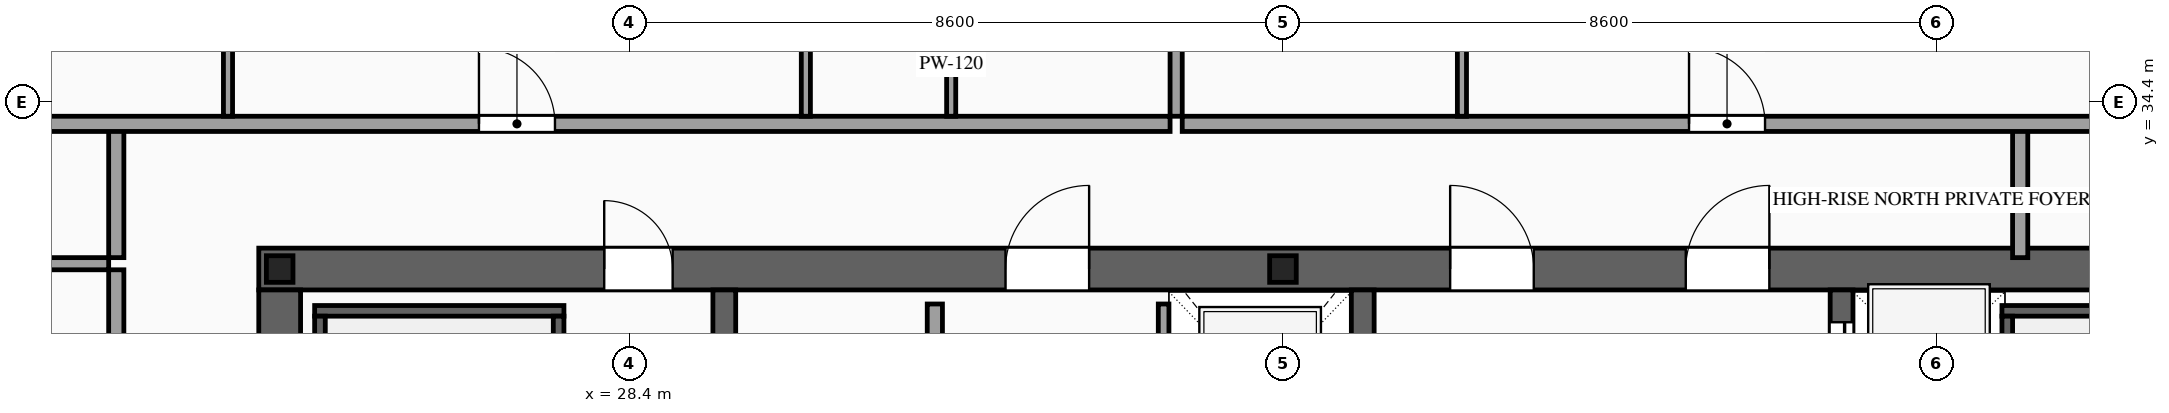
"""IFC4 building model, lengths in metres.
Left out: names, types, materials, properties, quantities, classifications, styles, units other than length and angle.
Written with IfcOpenShell. Run it as: python <this file> out.ifc"""

import sys

from ifc_helpers import new_model, si_unit, direction, frame, frame_2d, origin, origin_2d, place, context, subcontext, project, spatial, rectangle, i_section, extrude, source, transform, mapped, element, fill, save


model = new_model("IFC4")
c1 = context("Model", 3, precision=1e-05, world=origin(), true_north=direction((0.0, 1.0)))
c2 = subcontext(c1, "Body", "Model", "MODEL_VIEW")
j1 = project(units=[si_unit("LENGTHUNIT", "METRE"), si_unit("PLANEANGLEUNIT", "RADIAN")], contexts=[c1])
p1 = place(None, origin())
s1 = spatial("IfcSite", under=j1, at=p1, CompositionType="ELEMENT")
p2 = place(p1, origin())
s2 = spatial("IfcBuilding", under=s1, at=p2, CompositionType="ELEMENT")
p3 = place(p2, frame((0.0, 0.0, 282.1)))
s3 = spatial("IfcBuildingStorey", under=s2, at=p3, CompositionType="ELEMENT", Elevation=282.1)
p4 = place(p3, frame((23.525, 32.2, 0.0), z_axis=(0.0, 0.0, 1.0), x_axis=(1.0, 0.0, 0.0)))
e1 = element("IfcWall", 1, at=p4, inside=s3, PredefinedType="SHEAR", context=c2, shape_type="SweptSolid", body=[
    extrude(rectangle(XDim=26.95, YDim=0.55, at=frame_2d((13.475, 0.0))), origin(), (0.0, 0.0, 1.0), 3.5),
])
p5 = place(p4, frame((4.545, 0.0, 0.0)))
e2 = element("IfcOpeningElement", 2, at=p5, cuts=e1, PredefinedType="OPENING", context=c2, shape_type="SweptSolid", body=[
    extrude(rectangle(XDim=0.9, YDim=2.15, at=frame_2d((0.45, 1.075))), frame((0.0, 0.29, 0.0), z_axis=(0.0, -1.0, 0.0), x_axis=(1.0, 0.0, 0.0)), (0.0, 0.0, 1.0), 0.58),
])
p6 = place(p4, frame((9.825, 0.0, 0.0)))
e3 = element("IfcOpeningElement", 3, at=p6, cuts=e1, PredefinedType="OPENING", context=c2, shape_type="SweptSolid", body=[
    extrude(rectangle(XDim=1.1, YDim=2.2, at=frame_2d((0.55, 1.1))), frame((0.0, 0.29, 0.0), z_axis=(0.0, -1.0, 0.0), x_axis=(1.0, 0.0, 0.0)), (0.0, 0.0, 1.0), 0.58),
])
p7 = place(p4, frame((15.675, 0.0, 0.0)))
e4 = element("IfcOpeningElement", 4, at=p7, cuts=e1, PredefinedType="OPENING", context=c2, shape_type="SweptSolid", body=[
    extrude(rectangle(XDim=1.1, YDim=2.2, at=frame_2d((0.55, 1.1))), frame((0.0, 0.29, 0.0), z_axis=(0.0, -1.0, 0.0), x_axis=(1.0, 0.0, 0.0)), (0.0, 0.0, 1.0), 0.58),
])
p8 = place(p4, frame((18.775, 0.0, 0.0)))
e5 = element("IfcOpeningElement", 5, at=p8, cuts=e1, PredefinedType="OPENING", context=c2, shape_type="SweptSolid", body=[
    extrude(rectangle(XDim=1.1, YDim=2.2, at=frame_2d((0.55, 1.1))), frame((0.0, 0.29, 0.0), z_axis=(0.0, -1.0, 0.0), x_axis=(1.0, 0.0, 0.0)), (0.0, 0.0, 1.0), 0.58),
])
m1 = source(origin(), c2, "Body", "SweptSolid", [
    extrude(rectangle(XDim=12.25, YDim=0.55, at=frame_2d((6.125, 0.0))), origin(), (0.0, 0.0, 1.0), 3.5),
])
p9 = place(p3, frame((23.8, 19.675, 0.0), z_axis=(0.0, 0.0, 1.0), x_axis=(0.0, 1.0, 0.0)))
e6 = element("IfcWall", 6, at=p9, inside=s3, PredefinedType="SHEAR", context=c2, shape_type="MappedRepresentation", body=[
    mapped(m1, transform((0.0, 0.0, 0.0), scale=1.0)),
])
m2 = source(origin(), c2, "Body", "SweptSolid", [
    extrude(rectangle(XDim=12.25, YDim=0.3, at=frame_2d((6.125, 0.0))), origin(), (0.0, 0.0, 1.0), 3.5),
])
for number, where, z_axis, x_axis in (
    (7, (29.65, 19.675, 0.0), (0.0, 0.0, 1.0), (0.0, 1.0, 0.0)),
    (8, (38.05, 19.675, 0.0), (0.0, 0.0, 1.0), (0.0, 1.0, 0.0)),
):
    element("IfcWall", number, at=place(p3, frame(where, z_axis=z_axis, x_axis=x_axis)), inside=s3, PredefinedType="SOLIDWALL", context=c2, shape_type="MappedRepresentation", body=[
        mapped(m2, transform((0.0, 0.0, 0.0), scale=1.0)),
    ])
p10 = place(p3, frame((44.35, 19.675, 0.0), z_axis=(0.0, 0.0, 1.0), x_axis=(0.0, 1.0, 0.0)))
e9 = element("IfcWall", 9, at=p10, inside=s3, PredefinedType="SOLIDWALL", context=c2, shape_type="SweptSolid", body=[
    extrude(rectangle(XDim=12.25, YDim=0.3, at=frame_2d((6.125, 0.0))), origin(), (0.0, 0.0, 1.0), 3.5),
])
p11 = place(p10, frame((6.525, 0.0, 0.0)))
e10 = element("IfcOpeningElement", 10, at=p11, cuts=e9, PredefinedType="OPENING", context=c2, shape_type="SweptSolid", body=[
    extrude(rectangle(XDim=1.1, YDim=2.2, at=frame_2d((0.55, 1.1))), frame((0.0, 0.165, 0.0), z_axis=(0.0, -1.0, 0.0), x_axis=(1.0, 0.0, 0.0)), (0.0, 0.0, 1.0), 0.33),
])
p12 = place(p10, frame((8.625, 0.0, 0.0)))
e11 = element("IfcOpeningElement", 11, at=p12, cuts=e9, PredefinedType="OPENING", context=c2, shape_type="SweptSolid", body=[
    extrude(rectangle(XDim=1.1, YDim=2.2, at=frame_2d((0.55, 1.1))), frame((0.0, 0.165, 0.0), z_axis=(0.0, -1.0, 0.0), x_axis=(1.0, 0.0, 0.0)), (0.0, 0.0, 1.0), 0.33),
])
p13 = place(p10, frame((10.725, 0.0, 0.0)))
e12 = element("IfcOpeningElement", 12, at=p13, cuts=e9, PredefinedType="OPENING", context=c2, shape_type="SweptSolid", body=[
    extrude(rectangle(XDim=1.1, YDim=2.2, at=frame_2d((0.55, 1.1))), frame((0.0, 0.165, 0.0), z_axis=(0.0, -1.0, 0.0), x_axis=(1.0, 0.0, 0.0)), (0.0, 0.0, 1.0), 0.33),
])
m3 = source(origin(), c2, "Body", "SweptSolid", [
    extrude(i_section(OverallWidth=0.35, OverallDepth=0.35, WebThickness=0.012, FlangeThickness=0.019, at=origin_2d()), origin(), (0.0, 0.0, 1.0), 3.5),
])
for number, where, z_axis, x_axis in (
    (13, (23.8, 32.2, 0.0), (0.0, 0.0, 1.0), (1.0, 0.0, 0.0)),
    (14, (37.0, 32.2, 0.0), (0.0, 0.0, 1.0), (1.0, 0.0, 0.0)),
):
    element("IfcColumn", number, at=place(p3, frame(where, z_axis=z_axis, x_axis=x_axis)), inside=s3, PredefinedType="COLUMN", context=c2, shape_type="MappedRepresentation", body=[
        mapped(m3, transform((0.0, 0.0, 0.0), scale=1.0)),
    ])
p14 = place(p3, frame((35.43, 29.4, 0.0), z_axis=(0.0, 0.0, 1.0), x_axis=(0.0, 1.0, 0.0)))
e15 = element("IfcWall", 15, at=p14, inside=s3, PredefinedType="SOLIDWALL", context=c2, shape_type="SweptSolid", body=[
    extrude(rectangle(XDim=2.34, YDim=0.14, at=frame_2d((1.17, 0.0))), origin(), (0.0, 0.0, 1.0), 3.28),
])
p15 = place(p14, frame((0.62, 0.0, 0.0)))
e16 = element("IfcOpeningElement", 16, at=p15, cuts=e15, PredefinedType="OPENING", context=c2, shape_type="SweptSolid", body=[
    extrude(rectangle(XDim=1.1, YDim=2.2, at=frame_2d((0.55, 1.1))), frame((0.0, 0.085, 0.0), z_axis=(0.0, -1.0, 0.0), x_axis=(1.0, 0.0, 0.0)), (0.0, 0.0, 1.0), 0.17),
])
m4 = source(origin(), c2, "Body", "SweptSolid", [
    extrude(rectangle(XDim=3.28, YDim=0.14, at=frame_2d((1.64, 0.0))), origin(), (0.0, 0.0, 1.0), 3.28),
])
p16 = place(p3, frame((24.26, 31.65, 0.0), z_axis=(0.0, 0.0, 1.0), x_axis=(1.0, 0.0, 0.0)))
e17 = element("IfcWall", 17, at=p16, inside=s3, PredefinedType="SOLIDWALL", context=c2, shape_type="MappedRepresentation", body=[
    mapped(m4, transform((0.0, 0.0, 0.0), scale=1.0)),
])
m5 = source(origin(), c2, "Body", "SweptSolid", [
    extrude(rectangle(XDim=8.94, YDim=0.14, at=frame_2d((4.47, 0.0))), origin(), (0.0, 0.0, 1.0), 3.28),
])
for number, where, z_axis, x_axis in (
    (18, (24.33, 22.64, 0.0), (0.0, 0.0, 1.0), (0.0, 1.0, 0.0)),
    (19, (27.47, 22.64, 0.0), (0.0, 0.0, 1.0), (0.0, 1.0, 0.0)),
):
    element("IfcWall", number, at=place(p3, frame(where, z_axis=z_axis, x_axis=x_axis)), inside=s3, PredefinedType="SOLIDWALL", context=c2, shape_type="MappedRepresentation", body=[
        mapped(m5, transform((0.0, 0.0, 0.0), scale=1.0)),
    ])
p17 = place(p3, frame((46.46, 31.65, 0.0), z_axis=(0.0, 0.0, 1.0), x_axis=(1.0, 0.0, 0.0)))
e20 = element("IfcWall", 20, at=p17, inside=s3, PredefinedType="SOLIDWALL", context=c2, shape_type="MappedRepresentation", body=[
    mapped(m4, transform((0.0, 0.0, 0.0), scale=1.0)),
])
p18 = place(p3, frame((46.53, 22.64, 0.0), z_axis=(0.0, 0.0, 1.0), x_axis=(0.0, 1.0, 0.0)))
e21 = element("IfcWall", 21, at=p18, inside=s3, PredefinedType="SOLIDWALL", context=c2, shape_type="MappedRepresentation", body=[
    mapped(m5, transform((0.0, 0.0, 0.0), scale=1.0)),
])
p19 = place(p3, frame((32.42, 19.86, 0.0), z_axis=(0.0, 0.0, 1.0), x_axis=(0.0, 1.0, 0.0)))
e22 = element("IfcWall", 22, at=p19, inside=s3, PredefinedType="PARTITIONING", context=c2, shape_type="SweptSolid", body=[
    extrude(rectangle(XDim=11.88, YDim=0.2, at=frame_2d((5.94, 0.0))), origin(), (0.0, 0.0, 1.0), 3.28),
])
p20 = place(p19, frame((5.49, 0.0, 0.0)))
e23 = element("IfcOpeningElement", 23, at=p20, cuts=e22, PredefinedType="OPENING", context=c2, shape_type="SweptSolid", body=[
    extrude(rectangle(XDim=0.9, YDim=2.15, at=frame_2d((0.45, 1.075))), frame((0.0, 0.115, 0.0), z_axis=(0.0, -1.0, 0.0), x_axis=(1.0, 0.0, 0.0)), (0.0, 0.0, 1.0), 0.23),
])
m6 = source(origin(), c2, "Body", "SweptSolid", [
    extrude(rectangle(XDim=1.7, YDim=0.2, at=frame_2d((0.85, 0.0))), origin(), (0.0, 0.0, 1.0), 3.28),
])
for number, where, z_axis, x_axis in (
    (24, (21.65, 32.35, 0.0), (0.0, 0.0, 1.0), (0.0, 1.0, 0.0)),
    (25, (46.7, 32.35, 0.0), (0.0, 0.0, 1.0), (0.0, 1.0, 0.0)),
):
    element("IfcWall", number, at=place(p3, frame(where, z_axis=z_axis, x_axis=x_axis)), inside=s3, PredefinedType="PARTITIONING", context=c2, shape_type="MappedRepresentation", body=[
        mapped(m6, transform((0.0, 0.0, 0.0), scale=1.0)),
    ])
p21 = place(p3, frame((19.44, 34.11, 0.0), z_axis=(0.0, 0.0, 1.0), x_axis=(1.0, 0.0, 0.0)))
e26 = element("IfcWall", 26, at=p21, inside=s3, PredefinedType="PARTITIONING", context=c2, shape_type="SweptSolid", body=[
    extrude(rectangle(XDim=16.075, YDim=0.2, at=frame_2d((8.038, 0.0))), origin(), (0.0, 0.0, 1.0), 3.28),
])
p22 = place(p21, frame((6.982, 0.0, 0.0)))
e27 = element("IfcOpeningElement", 27, at=p22, cuts=e26, PredefinedType="OPENING", context=c2, shape_type="SweptSolid", body=[
    extrude(rectangle(XDim=1.0, YDim=2.2, at=frame_2d((0.5, 1.1))), frame((0.0, 0.115, 0.0), z_axis=(0.0, -1.0, 0.0), x_axis=(1.0, 0.0, 0.0)), (0.0, 0.0, 1.0), 0.23),
])
m7 = source(origin(), c2, "Body", "SweptSolid", [
    extrude(rectangle(XDim=12.04, YDim=0.16, at=frame_2d((6.02, 0.0))), origin(), (0.0, 0.0, 1.0), 3.28),
])
p23 = place(p3, frame((35.595, 34.21, 0.0), z_axis=(0.0, 0.0, 1.0), x_axis=(0.0, 1.0, 0.0)))
e28 = element("IfcWall", 28, at=p23, inside=s3, PredefinedType="PARTITIONING", context=c2, shape_type="MappedRepresentation", body=[
    mapped(m7, transform((0.0, 0.0, 0.0), scale=1.0)),
])
m8 = source(origin(), c2, "Body", "SweptSolid", [
    extrude(rectangle(XDim=4.11, YDim=0.12, at=frame_2d((2.055, 0.0))), origin(), (0.0, 0.0, 1.0), 1.675),
])
p24 = place(p3, frame((23.12, 34.21, 0.0), z_axis=(0.0, 0.0, 1.0), x_axis=(0.0, 1.0, 0.0)))
e29 = element("IfcWall", 29, at=p24, inside=s3, PredefinedType="PARTITIONING", context=c2, shape_type="MappedRepresentation", body=[
    mapped(m8, transform((0.0, 0.0, 0.0), scale=1.0)),
])
p25 = place(p3, frame((32.635, 34.21, 0.0), z_axis=(0.0, 0.0, 1.0), x_axis=(0.0, 1.0, 0.0)))
e30 = element("IfcWall", 30, at=p25, inside=s3, PredefinedType="PARTITIONING", context=c2, shape_type="SweptSolid", body=[
    extrude(rectangle(XDim=4.11, YDim=0.12, at=frame_2d((2.055, 0.0))), origin(), (0.0, 0.0, 1.0), 3.28),
])
p26 = place(p25, frame((1.63, 0.0, 0.0)))
e31 = element("IfcOpeningElement", 31, at=p26, cuts=e30, PredefinedType="OPENING", context=c2, shape_type="SweptSolid", body=[
    extrude(rectangle(XDim=0.85, YDim=2.1, at=frame_2d((0.425, 1.05))), frame((0.0, 0.075, 0.0), z_axis=(0.0, -1.0, 0.0), x_axis=(1.0, 0.0, 0.0)), (0.0, 0.0, 1.0), 0.15),
])
p27 = place(p3, frame((30.723, 34.21, 0.0), z_axis=(0.0, 0.0, 1.0), x_axis=(0.0, 1.0, 0.0)))
e32 = element("IfcWall", 32, at=p27, inside=s3, PredefinedType="PARTITIONING", context=c2, shape_type="SweptSolid", body=[
    extrude(rectangle(XDim=4.11, YDim=0.12, at=frame_2d((2.055, 0.0))), origin(), (0.0, 0.0, 1.0), 3.28),
])
p28 = place(p27, frame((1.63, 0.0, 0.0)))
e33 = element("IfcOpeningElement", 33, at=p28, cuts=e32, PredefinedType="OPENING", context=c2, shape_type="SweptSolid", body=[
    extrude(rectangle(XDim=0.85, YDim=2.1, at=frame_2d((0.425, 1.05))), frame((0.0, 0.075, 0.0), z_axis=(0.0, -1.0, 0.0), x_axis=(1.0, 0.0, 0.0)), (0.0, 0.0, 1.0), 0.15),
])
p29 = place(p3, frame((35.675, 34.11, 0.0), z_axis=(0.0, 0.0, 1.0), x_axis=(1.0, 0.0, 0.0)))
e34 = element("IfcWall", 34, at=p29, inside=s3, PredefinedType="PARTITIONING", context=c2, shape_type="SweptSolid", body=[
    extrude(rectangle(XDim=18.885, YDim=0.2, at=frame_2d((9.442, 0.0))), origin(), (0.0, 0.0, 1.0), 3.28),
])
p30 = place(p29, frame((6.668, 0.0, 0.0)))
e35 = element("IfcOpeningElement", 35, at=p30, cuts=e34, PredefinedType="OPENING", context=c2, shape_type="SweptSolid", body=[
    extrude(rectangle(XDim=1.0, YDim=2.2, at=frame_2d((0.5, 1.1))), frame((0.0, 0.115, 0.0), z_axis=(0.0, -1.0, 0.0), x_axis=(1.0, 0.0, 0.0)), (0.0, 0.0, 1.0), 0.23),
])
m9 = source(origin(), c2, "Body", "SweptSolid", [
    extrude(rectangle(XDim=4.11, YDim=0.12, at=frame_2d((2.055, 0.0))), origin(), (0.0, 0.0, 1.0), 3.28),
])
p31 = place(p3, frame((39.355, 34.21, 0.0), z_axis=(0.0, 0.0, 1.0), x_axis=(0.0, 1.0, 0.0)))
e36 = element("IfcWall", 36, at=p31, inside=s3, PredefinedType="PARTITIONING", context=c2, shape_type="MappedRepresentation", body=[
    mapped(m9, transform((0.0, 0.0, 0.0), scale=1.0)),
])
p32 = place(p3, frame((21.65, 19.41, 0.0), z_axis=(0.0, 0.0, 1.0), x_axis=(0.0, 1.0, 0.0)))
e37 = element("IfcWall", 37, at=p32, inside=s3, PredefinedType="PARTITIONING", context=c2, shape_type="SweptSolid", body=[
    extrude(rectangle(XDim=12.78, YDim=0.2, at=frame_2d((6.39, 0.0))), origin(), (0.0, 0.0, 1.0), 3.28),
])
p33 = place(p32, frame((5.042, 0.0, 0.0)))
e38 = element("IfcOpeningElement", 38, at=p33, cuts=e37, PredefinedType="OPENING", context=c2, shape_type="SweptSolid", body=[
    extrude(rectangle(XDim=1.0, YDim=2.2, at=frame_2d((0.5, 1.1))), frame((0.0, 0.115, 0.0), z_axis=(0.0, -1.0, 0.0), x_axis=(1.0, 0.0, 0.0)), (0.0, 0.0, 1.0), 0.23),
])
m10 = source(origin(), c2, "Body", "SweptSolid", [
    extrude(rectangle(XDim=5.0, YDim=0.16, at=frame_2d((2.5, 0.0))), origin(), (0.0, 0.0, 1.0), 3.28),
])
p34 = place(p3, frame((16.55, 32.27, 0.0), z_axis=(0.0, 0.0, 1.0), x_axis=(1.0, 0.0, 0.0)))
e39 = element("IfcWall", 39, at=p34, inside=s3, PredefinedType="PARTITIONING", context=c2, shape_type="MappedRepresentation", body=[
    mapped(m10, transform((0.0, 0.0, 0.0), scale=1.0)),
])
m11 = source(origin(), c2, "Body", "SweptSolid", [
    extrude(rectangle(XDim=1.1, YDim=2.2, at=frame_2d((0.55, 1.1))), frame((0.0, 0.025, 0.0), z_axis=(0.0, -1.0, 0.0), x_axis=(1.0, 0.0, 0.0)), (0.0, 0.0, 1.0), 0.05),
])
p35 = place(p13, origin())
e40 = element("IfcDoor", 40, at=p35, inside=s3, OperationType="SLIDING_TO_LEFT", PredefinedType="DOOR", context=c2, shape_type="MappedRepresentation", body=[
    mapped(m11, transform((0.0, 0.0, 0.0), scale=1.0)),
])
fill(e12, e40)
m12 = source(origin(), c2, "Body", "SweptSolid", [
    extrude(rectangle(XDim=0.9, YDim=2.15, at=frame_2d((0.45, 1.075))), frame((0.0, 0.025, 0.0), z_axis=(0.0, -1.0, 0.0), x_axis=(1.0, 0.0, 0.0)), (0.0, 0.0, 1.0), 0.05),
])
p36 = place(p5, origin())
e41 = element("IfcDoor", 41, at=p36, inside=s3, OperationType="SINGLE_SWING_LEFT", PredefinedType="DOOR", context=c2, shape_type="MappedRepresentation", body=[
    mapped(m12, transform((0.0, 0.0, 0.0), scale=1.0)),
])
fill(e2, e41)
m13 = source(origin(), c2, "Body", "SweptSolid", [
    extrude(rectangle(XDim=1.1, YDim=2.2, at=frame_2d((0.55, 1.1))), frame((0.0, 0.025, 0.0), z_axis=(0.0, -1.0, 0.0), x_axis=(1.0, 0.0, 0.0)), (0.0, 0.0, 1.0), 0.05),
])
p37 = place(p6, origin())
e42 = element("IfcDoor", 42, at=p37, inside=s3, OperationType="SINGLE_SWING_RIGHT", PredefinedType="DOOR", context=c2, shape_type="MappedRepresentation", body=[
    mapped(m13, transform((0.0, 0.0, 0.0), scale=1.0)),
])
fill(e3, e42)
p38 = place(p7, origin())
e43 = element("IfcDoor", 43, at=p38, inside=s3, OperationType="SINGLE_SWING_LEFT", PredefinedType="DOOR", context=c2, shape_type="MappedRepresentation", body=[
    mapped(m13, transform((0.0, 0.0, 0.0), scale=1.0)),
])
fill(e4, e43)
p39 = place(p8, origin())
e44 = element("IfcDoor", 44, at=p39, inside=s3, OperationType="SINGLE_SWING_RIGHT", PredefinedType="DOOR", context=c2, shape_type="MappedRepresentation", body=[
    mapped(m13, transform((0.0, 0.0, 0.0), scale=1.0)),
])
fill(e5, e44)
m14 = source(origin(), c2, "Body", "SweptSolid", [
    extrude(rectangle(XDim=1.0, YDim=2.2, at=frame_2d((0.5, 1.1))), frame((0.0, 0.025, 0.0), z_axis=(0.0, -1.0, 0.0), x_axis=(1.0, 0.0, 0.0)), (0.0, 0.0, 1.0), 0.05),
])
p40 = place(p22, origin())
e45 = element("IfcDoor", 45, at=p40, inside=s3, OperationType="SINGLE_SWING_LEFT", PredefinedType="DOOR", context=c2, shape_type="MappedRepresentation", body=[
    mapped(m14, transform((0.0, 0.0, 0.0), scale=1.0)),
])
fill(e27, e45)
p41 = place(p30, origin())
e46 = element("IfcDoor", 46, at=p41, inside=s3, OperationType="SINGLE_SWING_LEFT", PredefinedType="DOOR", context=c2, shape_type="MappedRepresentation", body=[
    mapped(m14, transform((0.0, 0.0, 0.0), scale=1.0)),
])
fill(e35, e46)
save(model, sys.argv[1])
